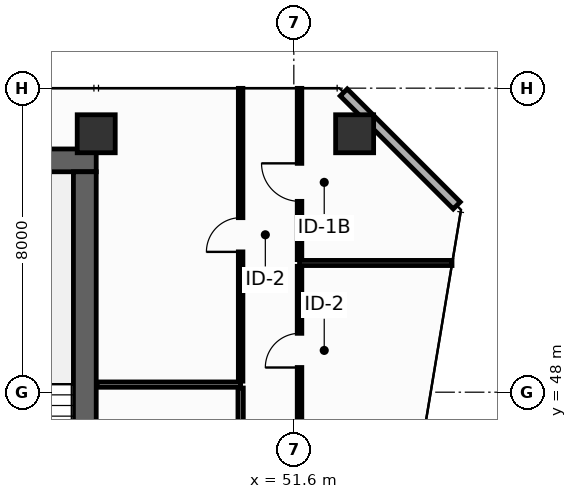
"""IFC4 building model, lengths in metres.
Left out: names, types, materials, properties, quantities, classifications, styles, units other than length and angle.
Written with IfcOpenShell. Run it as: python <this file> out.ifc"""

import sys

from ifc_helpers import new_model, si_unit, direction, frame, frame_2d, origin, origin_2d, place, context, subcontext, project, spatial, rectangle, hollow_rectangle, extrude, element, fill, save


model = new_model("IFC4")
c1 = context("Model", 3, precision=1e-05, world=origin(), true_north=direction((0.0, 1.0)))
c2 = subcontext(c1, "Body", "Model", "MODEL_VIEW")
j1 = project(units=[si_unit("LENGTHUNIT", "METRE"), si_unit("PLANEANGLEUNIT", "RADIAN")], contexts=[c1])
p1 = place(None, origin())
s1 = spatial("IfcSite", under=j1, at=p1, CompositionType="ELEMENT")
p2 = place(p1, origin())
s2 = spatial("IfcBuilding", under=s1, at=p2, CompositionType="ELEMENT")
p3 = place(p2, frame((0.0, 0.0, 114.8)))
s3 = spatial("IfcBuildingStorey", under=s2, at=p3, CompositionType="ELEMENT", Elevation=114.8)
p4 = place(p3, frame((13.5, 54.1, 0.0), z_axis=(0.0, 0.0, 1.0), x_axis=(1.0, 0.0, 0.0)))
e1 = element("IfcWall", 1, at=p4, inside=s3, PredefinedType="SHEAR", context=c2, shape_type="SweptSolid", body=[
    extrude(rectangle(XDim=32.9, YDim=0.6, at=frame_2d((16.45, 0.0))), origin(), (0.0, 0.0, 1.0), 4.15),
])
p5 = place(p3, frame((46.1, 43.4, 0.0), z_axis=(0.0, 0.0, 1.0), x_axis=(0.0, 1.0, 0.0)))
e2 = element("IfcWall", 2, at=p5, inside=s3, PredefinedType="SHEAR", context=c2, shape_type="SweptSolid", body=[
    extrude(rectangle(XDim=10.4, YDim=0.6, at=frame_2d((5.2, 0.0))), origin(), (0.0, 0.0, 1.0), 4.15),
])
for number, where, z_axis, x_axis in (
    (3, (46.4, 54.8, 0.0), (0.0, 0.0, 1.0), (1.0, 0.0, 0.0)),
    (4, (53.2, 54.8, 0.0), (0.0, 0.0, 1.0), (1.0, 0.0, 0.0)),
):
    element("IfcColumn", number, at=place(p3, frame(where, z_axis=z_axis, x_axis=x_axis)), inside=s3, PredefinedType="COLUMN", context=c2, shape_type="SweptSolid", body=[
        extrude(hollow_rectangle(XDim=1.0, YDim=1.0, WallThickness=0.045, at=origin_2d()), origin(), (0.0, 0.0, 1.0), 4.4),
    ])
p6 = place(p3, frame((55.887, 52.913, 0.0), z_axis=(0.0, 0.0, 1.0), x_axis=(-0.707106781187, 0.707106781187, 0.0)))
e5 = element("IfcWall", 5, at=p6, inside=s3, PredefinedType="STANDARD", context=c2, shape_type="SweptSolid", body=[
    extrude(rectangle(XDim=4.206, YDim=0.26, at=frame_2d((2.103, 0.0))), origin(), (0.0, 0.0, 1.0), 4.15),
])
p7 = place(p3, frame((46.42, 48.2, 0.0), z_axis=(0.0, 0.0, 1.0), x_axis=(1.0, 0.0, 0.0)))
e6 = element("IfcWall", 6, at=p7, inside=s3, PredefinedType="PARTITIONING", context=c2, shape_type="SweptSolid", body=[
    extrude(rectangle(XDim=3.78, YDim=0.14, at=frame_2d((1.89, 0.0))), origin(), (0.0, 0.0, 1.0), 4.15),
])
p8 = place(p3, frame((50.2, 40.94, 0.0), z_axis=(0.0, 0.0, 1.0), x_axis=(0.0, 1.0, 0.0)))
e7 = element("IfcWall", 7, at=p8, inside=s3, PredefinedType="PARTITIONING", context=c2, shape_type="SweptSolid", body=[
    extrude(rectangle(XDim=7.17, YDim=0.14, at=frame_2d((3.585, 0.0))), origin(), (0.0, 0.0, 1.0), 3.335),
])
p9 = place(p8, frame((3.135, 0.0, 0.0)))
e8 = element("IfcOpeningElement", 8, at=p9, cuts=e7, PredefinedType="OPENING", context=c2, shape_type="SweptSolid", body=[
    extrude(rectangle(XDim=0.9, YDim=2.1, at=frame_2d((0.45, 1.05))), frame((0.0, 0.08, 0.0), z_axis=(0.0, -1.0, 0.0), x_axis=(1.0, 0.0, 0.0)), (0.0, 0.0, 1.0), 0.16),
])
p10 = place(p3, frame((50.2, 48.29, 0.0), z_axis=(0.0, 0.0, 1.0), x_axis=(0.0, 1.0, 0.0)))
e9 = element("IfcWall", 9, at=p10, inside=s3, PredefinedType="PARTITIONING", context=c2, shape_type="SweptSolid", body=[
    extrude(rectangle(XDim=7.705, YDim=0.12, at=frame_2d((3.853, 0.0))), origin(), (0.0, 0.0, 1.0), 3.435),
])
p11 = place(p10, frame((3.402, 0.0, 0.0)))
e10 = element("IfcOpeningElement", 10, at=p11, cuts=e9, PredefinedType="OPENING", context=c2, shape_type="SweptSolid", body=[
    extrude(rectangle(XDim=0.9, YDim=2.1, at=frame_2d((0.45, 1.05))), frame((0.0, 0.07, 0.0), z_axis=(0.0, -1.0, 0.0), x_axis=(1.0, 0.0, 0.0)), (0.0, 0.0, 1.0), 0.14),
])
p12 = place(p3, frame((51.75, 51.4, 0.0), z_axis=(0.0, 0.0, 1.0), x_axis=(1.0, 0.0, 0.0)))
e11 = element("IfcWall", 11, at=p12, inside=s3, PredefinedType="PARTITIONING", context=c2, shape_type="SweptSolid", body=[
    extrude(rectangle(XDim=4.012, YDim=0.135, at=frame_2d((2.006, 0.0))), origin(), (0.0, 0.0, 1.0), 3.335),
])
p13 = place(p3, frame((51.75, 46.887, 0.0), z_axis=(0.0, 0.0, 1.0), x_axis=(0.0, 1.0, 0.0)))
e12 = element("IfcWall", 12, at=p13, inside=s3, PredefinedType="PARTITIONING", context=c2, shape_type="SweptSolid", body=[
    extrude(rectangle(XDim=4.425, YDim=0.12, at=frame_2d((2.212, 0.0))), origin(), (0.0, 0.0, 1.0), 4.15),
])
p14 = place(p13, frame((1.762, 0.0, 0.0)))
e13 = element("IfcOpeningElement", 13, at=p14, cuts=e12, PredefinedType="OPENING", context=c2, shape_type="SweptSolid", body=[
    extrude(rectangle(XDim=0.9, YDim=2.1, at=frame_2d((0.45, 1.05))), frame((0.0, 0.07, 0.0), z_axis=(0.0, -1.0, 0.0), x_axis=(1.0, 0.0, 0.0)), (0.0, 0.0, 1.0), 0.14),
])
p15 = place(p3, frame((51.75, 51.488, 0.0), z_axis=(0.0, 0.0, 1.0), x_axis=(0.0, 1.0, 0.0)))
e14 = element("IfcWall", 14, at=p15, inside=s3, PredefinedType="PARTITIONING", context=c2, shape_type="SweptSolid", body=[
    extrude(rectangle(XDim=4.508, YDim=0.12, at=frame_2d((2.254, 0.0))), origin(), (0.0, 0.0, 1.0), 3.435),
])
p16 = place(p15, frame((1.534, 0.0, 0.0)))
e15 = element("IfcOpeningElement", 15, at=p16, cuts=e14, PredefinedType="OPENING", context=c2, shape_type="SweptSolid", body=[
    extrude(rectangle(XDim=1.0, YDim=2.15, at=frame_2d((0.5, 1.075))), frame((0.0, 0.07, 0.0), z_axis=(0.0, -1.0, 0.0), x_axis=(1.0, 0.0, 0.0)), (0.0, 0.0, 1.0), 0.14),
])
p17 = place(p11, origin())
e16 = element("IfcDoor", 16, at=p17, inside=s3, OperationType="SINGLE_SWING_LEFT", PredefinedType="DOOR", context=c2, shape_type="SweptSolid", body=[
    extrude(rectangle(XDim=0.9, YDim=2.1, at=frame_2d((0.45, 1.05))), frame((0.0, 0.025, 0.0), z_axis=(0.0, -1.0, 0.0), x_axis=(1.0, 0.0, 0.0)), (0.0, 0.0, 1.0), 0.05),
])
fill(e10, e16)
p18 = place(p14, origin())
e17 = element("IfcDoor", 17, at=p18, inside=s3, OperationType="SINGLE_SWING_LEFT", PredefinedType="DOOR", context=c2, shape_type="SweptSolid", body=[
    extrude(rectangle(XDim=0.9, YDim=2.1, at=frame_2d((0.45, 1.05))), frame((0.0, 0.025, 0.0), z_axis=(0.0, -1.0, 0.0), x_axis=(1.0, 0.0, 0.0)), (0.0, 0.0, 1.0), 0.05),
])
fill(e13, e17)
p19 = place(p16, origin())
e18 = element("IfcDoor", 18, at=p19, inside=s3, OperationType="SINGLE_SWING_RIGHT", PredefinedType="DOOR", context=c2, shape_type="SweptSolid", body=[
    extrude(rectangle(XDim=1.0, YDim=2.15, at=frame_2d((0.5, 1.075))), frame((0.0, 0.025, 0.0), z_axis=(0.0, -1.0, 0.0), x_axis=(1.0, 0.0, 0.0)), (0.0, 0.0, 1.0), 0.05),
])
fill(e15, e18)
save(model, sys.argv[1])
